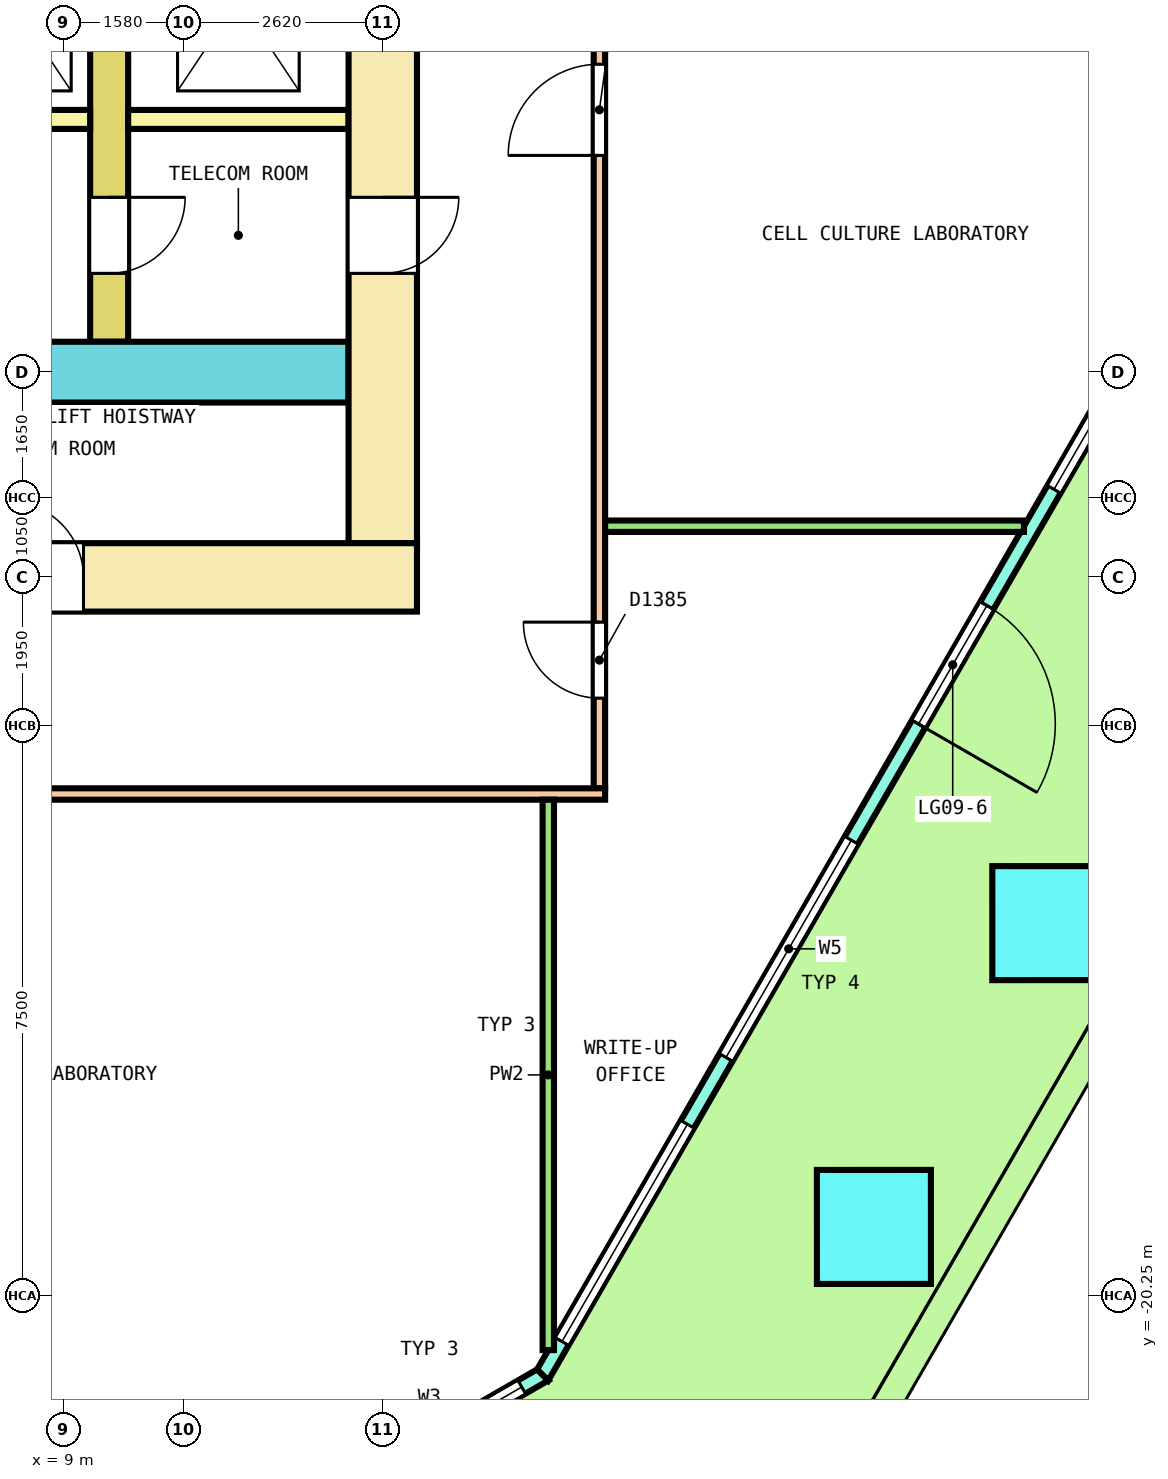
"""IFC4 building model, lengths in metres.
Left out: names, types, materials, properties, quantities, classifications, styles, units other than length and angle.
Written with IfcOpenShell. Run it as: python <this file> out.ifc"""

import sys

from ifc_helpers import new_model, si_unit, direction, frame, frame_2d, origin, origin_2d, place, context, subcontext, project, spatial, polyline, rectangle, outline, extrude, element, fill, save


model = new_model("IFC4")
c1 = context("Model", 3, precision=1e-05, world=origin(), true_north=direction((0.0, 1.0)))
c2 = subcontext(c1, "Body", "Model", "MODEL_VIEW")
j1 = project(units=[si_unit("LENGTHUNIT", "METRE"), si_unit("PLANEANGLEUNIT", "RADIAN")], contexts=[c1])
p1 = place(None, origin())
s1 = spatial("IfcSite", under=j1, at=p1, CompositionType="ELEMENT")
p2 = place(p1, origin())
s2 = spatial("IfcBuilding", under=s1, at=p2, CompositionType="ELEMENT")
p3 = place(p2, frame((0.0, 0.0, 41.0)))
s3 = spatial("IfcBuildingStorey", under=s2, at=p3, CompositionType="ELEMENT", Elevation=41.0)
p4 = place(p3, frame((19.662, -19.345, 0.0), z_axis=(-0.010908253887, -0.018863444567, 0.99976256204), x_axis=(0.50018659929, 0.865643429133, 0.021790353113)))
e1 = element("IfcColumn", 1, at=p4, inside=s3, PredefinedType="COLUMN", context=c2, shape_type="SweptSolid", body=[
    extrude(rectangle(XDim=1.5, YDim=1.5, at=origin_2d()), origin(), (0.0, 0.0, 1.0), 4.051),
])
p5 = place(p3, frame((21.969, -15.348, 0.0), z_axis=(-0.003616759812, -0.006269050341, 0.999973808685), x_axis=(0.499535500447, 0.866263182786, 0.007237536985)))
e2 = element("IfcColumn", 2, at=p5, inside=s3, PredefinedType="COLUMN", context=c2, shape_type="SweptSolid", body=[
    extrude(rectangle(XDim=1.5, YDim=1.5, at=origin_2d()), origin(), (0.0, 0.0, 1.0), 4.05),
])
p6 = place(p3, frame((9.351, -24.73, 0.0), z_axis=(0.0, 0.0, 1.0), x_axis=(0.866014080581, 0.50001961185, 0.0)))
e3 = element("IfcWall", 3, at=p6, inside=s3, PredefinedType="SOLIDWALL", context=c2, shape_type="SweptSolid", body=[
    extrude(outline(polyline([(-0.027, -0.1), (1.128, -0.1), (2.283, -0.1), (3.438, -0.1), (4.592, -0.1), (5.747, -0.1), (6.902, -0.1), (6.848, 0.1), (5.711, 0.1), (4.574, 0.1), (3.438, 0.1), (2.301, 0.1), (1.164, 0.1), (0.027, 0.1), (-0.027, -0.1)])), origin(), (0.0, 0.0, 1.0), 4.1),
])
p7 = place(p6, frame((0.319, 0.0, 0.1)))
e4 = element("IfcOpeningElement", 4, at=p7, cuts=e3, PredefinedType="OPENING", context=c2, shape_type="SweptSolid", body=[
    extrude(rectangle(XDim=2.8, YDim=2.9, at=frame_2d((1.4, 1.45))), frame((0.0, 0.11, 0.0), z_axis=(0.0, -1.0, 0.0), x_axis=(1.0, 0.0, 0.0)), (0.0, 0.0, 1.0), 0.22),
])
p8 = place(p6, frame((3.756, 0.0, 0.1)))
e5 = element("IfcOpeningElement", 5, at=p8, cuts=e3, PredefinedType="OPENING", context=c2, shape_type="SweptSolid", body=[
    extrude(rectangle(XDim=2.8, YDim=2.9, at=frame_2d((1.4, 1.45))), frame((0.0, 0.11, 0.0), z_axis=(0.0, -1.0, 0.0), x_axis=(1.0, 0.0, 0.0)), (0.0, 0.0, 1.0), 0.22),
])
p9 = place(p3, frame((15.304, -21.292, 0.0), z_axis=(0.0, 0.0, 1.0), x_axis=(0.500001945179, 0.866024280732, 0.0)))
e6 = element("IfcWall", 6, at=p9, inside=s3, PredefinedType="SOLIDWALL", context=c2, shape_type="SweptSolid", body=[
    extrude(outline(polyline([(-0.027, -0.1), (1.003, -0.1), (2.033, -0.1), (3.063, -0.1), (4.093, -0.1), (5.123, -0.1), (6.153, -0.1), (7.183, -0.1), (8.213, -0.1), (9.243, -0.1), (10.273, -0.1), (11.302, -0.1), (12.333, -0.1), (13.363, -0.1), (14.392, -0.1), (15.422, -0.1), (16.452, -0.1), (17.482, -0.1), (18.512, -0.1), (19.542, -0.1), (20.572, -0.1), (21.602, -0.1), (21.548, 0.1), (20.523, 0.1), (19.499, 0.1), (18.474, 0.1), (17.449, 0.1), (16.424, 0.1), (15.399, 0.1), (14.375, 0.1), (13.35, 0.1), (12.325, 0.1), (11.3, 0.1), (10.275, 0.1), (9.25, 0.1), (8.226, 0.1), (7.201, 0.1), (6.176, 0.1), (5.151, 0.1), (4.126, 0.1), (3.101, 0.1), (2.076, 0.1), (1.052, 0.1), (0.027, 0.1), (-0.027, -0.1)])), origin(), (0.0, 0.0, 1.0), 4.1),
])
p10 = place(p9, frame((0.508, 0.0, 0.1)))
e7 = element("IfcOpeningElement", 7, at=p10, cuts=e6, PredefinedType="OPENING", context=c2, shape_type="SweptSolid", body=[
    extrude(rectangle(XDim=3.3, YDim=2.9, at=frame_2d((1.65, 1.45))), frame((0.0, 0.11, 0.0), z_axis=(0.0, -1.0, 0.0), x_axis=(1.0, 0.0, 0.0)), (0.0, 0.0, 1.0), 0.22),
])
p11 = place(p9, frame((4.823, 0.0, 0.1)))
e8 = element("IfcOpeningElement", 8, at=p11, cuts=e6, PredefinedType="OPENING", context=c2, shape_type="SweptSolid", body=[
    extrude(rectangle(XDim=3.3, YDim=2.9, at=frame_2d((1.65, 1.45))), frame((0.0, 0.11, 0.0), z_axis=(0.0, -1.0, 0.0), x_axis=(1.0, 0.0, 0.0)), (0.0, 0.0, 1.0), 0.22),
])
p12 = place(p9, frame((9.888, 0.0, 0.0)))
e9 = element("IfcOpeningElement", 9, at=p12, cuts=e6, PredefinedType="OPENING", context=c2, shape_type="SweptSolid", body=[
    extrude(rectangle(XDim=1.8, YDim=2.4, at=frame_2d((0.9, 1.2))), frame((0.0, 0.11, 0.0), z_axis=(0.0, -1.0, 0.0), x_axis=(1.0, 0.0, 0.0)), (0.0, 0.0, 1.0), 0.22),
])
p13 = place(p9, frame((9.888, 0.0, 2.55)))
e10 = element("IfcOpeningElement", 10, at=p13, cuts=e6, PredefinedType="OPENING", context=c2, shape_type="SweptSolid", body=[
    extrude(rectangle(XDim=1.8, YDim=0.45, at=frame_2d((0.9, 0.225))), frame((0.0, 0.11, 0.0), z_axis=(0.0, -1.0, 0.0), x_axis=(1.0, 0.0, 0.0)), (0.0, 0.0, 1.0), 0.22),
])
p14 = place(p9, frame((13.453, 0.0, 0.1)))
e11 = element("IfcOpeningElement", 11, at=p14, cuts=e6, PredefinedType="OPENING", context=c2, shape_type="SweptSolid", body=[
    extrude(rectangle(XDim=3.3, YDim=2.9, at=frame_2d((1.65, 1.45))), frame((0.0, 0.11, 0.0), z_axis=(0.0, -1.0, 0.0), x_axis=(1.0, 0.0, 0.0)), (0.0, 0.0, 1.0), 0.22),
])
p15 = place(p9, frame((17.768, 0.0, 0.1)))
e12 = element("IfcOpeningElement", 12, at=p15, cuts=e6, PredefinedType="OPENING", context=c2, shape_type="SweptSolid", body=[
    extrude(rectangle(XDim=3.3, YDim=2.9, at=frame_2d((1.65, 1.45))), frame((0.0, 0.11, 0.0), z_axis=(0.0, -1.0, 0.0), x_axis=(1.0, 0.0, 0.0)), (0.0, 0.0, 1.0), 0.22),
])
p16 = place(p3, frame((-13.65, -10.8, 0.0), z_axis=(0.0, 0.0, 1.0), x_axis=(1.0, 0.0, 0.0)))
e13 = element("IfcWall", 13, at=p16, inside=s3, PredefinedType="SHEAR", context=c2, shape_type="SweptSolid", body=[
    extrude(rectangle(XDim=27.3, YDim=0.9, at=frame_2d((13.65, 0.0))), origin(), (0.0, 0.0, 1.0), 4.1),
])
p17 = place(p16, frame((1.911, 0.0, 0.0)))
e14 = element("IfcOpeningElement", 14, at=p17, cuts=e13, PredefinedType="OPENING", context=c2, shape_type="SweptSolid", body=[
    extrude(rectangle(XDim=1.0, YDim=2.1, at=frame_2d((0.5, 1.05))), frame((0.0, 0.46, 0.0), z_axis=(0.0, -1.0, 0.0), x_axis=(1.0, 0.0, 0.0)), (0.0, 0.0, 1.0), 0.92),
])
p18 = place(p16, frame((5.027, 0.0, 0.0)))
e15 = element("IfcOpeningElement", 15, at=p18, cuts=e13, PredefinedType="OPENING", context=c2, shape_type="SweptSolid", body=[
    extrude(rectangle(XDim=1.0, YDim=2.1, at=frame_2d((0.5, 1.05))), frame((0.0, 0.46, 0.0), z_axis=(0.0, -1.0, 0.0), x_axis=(1.0, 0.0, 0.0)), (0.0, 0.0, 1.0), 0.92),
])
p19 = place(p16, frame((8.111, 0.0, 0.0)))
e16 = element("IfcOpeningElement", 16, at=p19, cuts=e13, PredefinedType="OPENING", context=c2, shape_type="SweptSolid", body=[
    extrude(rectangle(XDim=1.0, YDim=2.1, at=frame_2d((0.5, 1.05))), frame((0.0, 0.46, 0.0), z_axis=(0.0, -1.0, 0.0), x_axis=(1.0, 0.0, 0.0)), (0.0, 0.0, 1.0), 0.92),
])
p20 = place(p16, frame((11.195, 0.0, 0.0)))
e17 = element("IfcOpeningElement", 17, at=p20, cuts=e13, PredefinedType="OPENING", context=c2, shape_type="SweptSolid", body=[
    extrude(rectangle(XDim=1.0, YDim=2.1, at=frame_2d((0.5, 1.05))), frame((0.0, 0.46, 0.0), z_axis=(0.0, -1.0, 0.0), x_axis=(1.0, 0.0, 0.0)), (0.0, 0.0, 1.0), 0.92),
])
p21 = place(p16, frame((21.913, 0.0, 0.0)))
e18 = element("IfcOpeningElement", 18, at=p21, cuts=e13, PredefinedType="OPENING", context=c2, shape_type="SweptSolid", body=[
    extrude(rectangle(XDim=1.0, YDim=2.1, at=frame_2d((0.5, 1.05))), frame((0.0, 0.46, 0.0), z_axis=(0.0, -1.0, 0.0), x_axis=(1.0, 0.0, 0.0)), (0.0, 0.0, 1.0), 0.92),
])
p22 = place(p16, frame((15.2, 0.0, 0.0)))
e19 = element("IfcOpeningElement", 19, at=p22, cuts=e13, PredefinedType="OPENING", context=c2, shape_type="SweptSolid", body=[
    extrude(rectangle(XDim=1.2, YDim=2.1, at=frame_2d((0.6, 1.05))), frame((0.0, 0.46, 0.0), z_axis=(0.0, -1.0, 0.0), x_axis=(1.0, 0.0, 0.0)), (0.0, 0.0, 1.0), 0.92),
])
p23 = place(p3, frame((13.2, -10.35, 0.0), z_axis=(0.0, 0.0, 1.0), x_axis=(0.0, 1.0, 0.0)))
e20 = element("IfcWall", 20, at=p23, inside=s3, PredefinedType="SHEAR", context=c2, shape_type="SweptSolid", body=[
    extrude(rectangle(XDim=20.7, YDim=0.9, at=frame_2d((10.35, 0.0))), origin(), (0.0, 0.0, 1.0), 4.1),
])
p24 = place(p23, frame((9.15, 0.0, 0.0)))
e21 = element("IfcOpeningElement", 21, at=p24, cuts=e20, PredefinedType="OPENING", context=c2, shape_type="SweptSolid", body=[
    extrude(rectangle(XDim=2.4, YDim=2.1, at=frame_2d((1.2, 1.05))), frame((0.0, 0.46, 0.0), z_axis=(0.0, -1.0, 0.0), x_axis=(1.0, 0.0, 0.0)), (0.0, 0.0, 1.0), 0.92),
])
p25 = place(p23, frame((16.05, 0.0, 0.0)))
e22 = element("IfcOpeningElement", 22, at=p25, cuts=e20, PredefinedType="OPENING", context=c2, shape_type="SweptSolid", body=[
    extrude(rectangle(XDim=1.2, YDim=2.1, at=frame_2d((0.6, 1.05))), frame((0.0, 0.46, 0.0), z_axis=(0.0, -1.0, 0.0), x_axis=(1.0, 0.0, 0.0)), (0.0, 0.0, 1.0), 0.92),
])
p26 = place(p23, frame((3.55, 0.0, 0.0)))
e23 = element("IfcOpeningElement", 23, at=p26, cuts=e20, PredefinedType="OPENING", context=c2, shape_type="SweptSolid", body=[
    extrude(rectangle(XDim=1.0, YDim=2.1, at=frame_2d((0.5, 1.05))), frame((0.0, 0.46, 0.0), z_axis=(0.0, -1.0, 0.0), x_axis=(1.0, 0.0, 0.0)), (0.0, 0.0, 1.0), 0.92),
])
p27 = place(p3, frame((-12.75, -8.1, 0.0), z_axis=(0.0, 0.0, 1.0), x_axis=(1.0, 0.0, 0.0)))
e24 = element("IfcWall", 24, at=p27, inside=s3, PredefinedType="SHEAR", context=c2, shape_type="SweptSolid", body=[
    extrude(rectangle(XDim=25.5, YDim=0.8, at=frame_2d((12.75, 0.0))), origin(), (0.0, 0.0, 1.0), 4.1),
])
p28 = place(p27, frame((14.3, 0.0, 0.0)))
e25 = element("IfcOpeningElement", 25, at=p28, cuts=e24, PredefinedType="OPENING", context=c2, shape_type="SweptSolid", body=[
    extrude(rectangle(XDim=1.2, YDim=2.1, at=frame_2d((0.6, 1.05))), frame((0.0, 0.41, 0.0), z_axis=(0.0, -1.0, 0.0), x_axis=(1.0, 0.0, 0.0)), (0.0, 0.0, 1.0), 0.82),
])
p29 = place(p3, frame((9.6, -7.7, 0.0), z_axis=(0.0, 0.0, 1.0), x_axis=(0.0, 1.0, 0.0)))
e26 = element("IfcWall", 26, at=p29, inside=s3, PredefinedType="SHEAR", context=c2, shape_type="SweptSolid", body=[
    extrude(rectangle(XDim=15.4, YDim=0.5, at=frame_2d((7.7, 0.0))), origin(), (0.0, 0.0, 1.0), 4.1),
])
p30 = place(p29, frame((6.5, 0.0, 0.0)))
e27 = element("IfcOpeningElement", 27, at=p30, cuts=e26, PredefinedType="OPENING", context=c2, shape_type="SweptSolid", body=[
    extrude(rectangle(XDim=2.4, YDim=2.1, at=frame_2d((1.2, 1.05))), frame((0.0, 0.26, 0.0), z_axis=(0.0, -1.0, 0.0), x_axis=(1.0, 0.0, 0.0)), (0.0, 0.0, 1.0), 0.52),
])
p31 = place(p29, frame((13.4, 0.0, 0.0)))
e28 = element("IfcOpeningElement", 28, at=p31, cuts=e26, PredefinedType="OPENING", context=c2, shape_type="SweptSolid", body=[
    extrude(rectangle(XDim=1.2, YDim=2.1, at=frame_2d((0.6, 1.05))), frame((0.0, 0.26, 0.0), z_axis=(0.0, -1.0, 0.0), x_axis=(1.0, 0.0, 0.0)), (0.0, 0.0, 1.0), 0.52),
])
p32 = place(p29, frame((0.9, 0.0, 0.0)))
e29 = element("IfcOpeningElement", 29, at=p32, cuts=e26, PredefinedType="OPENING", context=c2, shape_type="SweptSolid", body=[
    extrude(rectangle(XDim=1.0, YDim=2.1, at=frame_2d((0.5, 1.05))), frame((0.0, 0.26, 0.0), z_axis=(0.0, -1.0, 0.0), x_axis=(1.0, 0.0, 0.0)), (0.0, 0.0, 1.0), 0.52),
])
p33 = place(p3, frame((-9.35, -4.775, 0.0), z_axis=(0.0, 0.0, 1.0), x_axis=(1.0, 0.0, 0.0)))
e30 = element("IfcWall", 30, at=p33, inside=s3, PredefinedType="SOLIDWALL", context=c2, shape_type="SweptSolid", body=[
    extrude(rectangle(XDim=18.7, YDim=0.25, at=frame_2d((9.35, 0.0))), origin(), (0.0, 0.0, 1.0), 4.1),
])
p34 = place(p3, frame((9.85, -4.775, 0.0), z_axis=(0.0, 0.0, 1.0), x_axis=(1.0, 0.0, 0.0)))
e31 = element("IfcWall", 31, at=p34, inside=s3, PredefinedType="SOLIDWALL", context=c2, shape_type="SweptSolid", body=[
    extrude(rectangle(XDim=2.9, YDim=0.25, at=frame_2d((1.45, 0.0))), origin(), (0.0, 0.0, 1.0), 4.1),
])
p35 = place(p3, frame((16.05, -13.575, 0.0), z_axis=(0.0, 0.0, 1.0), x_axis=(0.0, 1.0, 0.0)))
e32 = element("IfcWall", 32, at=p35, inside=s3, PredefinedType="PARTITIONING", context=c2, shape_type="SweptSolid", body=[
    extrude(rectangle(XDim=27.15, YDim=0.15, at=frame_2d((13.575, 0.0))), origin(), (0.0, 0.0, 1.0), 3.05),
])
p36 = place(p35, frame((17.161, 0.0, 0.0)))
e33 = element("IfcOpeningElement", 33, at=p36, cuts=e32, PredefinedType="OPENING", context=c2, shape_type="SweptSolid", body=[
    extrude(rectangle(XDim=1.2, YDim=2.1, at=frame_2d((0.6, 1.05))), frame((0.0, 0.085, 0.0), z_axis=(0.0, -1.0, 0.0), x_axis=(1.0, 0.0, 0.0)), (0.0, 0.0, 1.0), 0.17),
])
p37 = place(p35, frame((23.671, 0.0, 0.0)))
e34 = element("IfcOpeningElement", 34, at=p37, cuts=e32, PredefinedType="OPENING", context=c2, shape_type="SweptSolid", body=[
    extrude(rectangle(XDim=1.0, YDim=2.1, at=frame_2d((0.5, 1.05))), frame((0.0, 0.085, 0.0), z_axis=(0.0, -1.0, 0.0), x_axis=(1.0, 0.0, 0.0)), (0.0, 0.0, 1.0), 0.17),
])
p38 = place(p35, frame((1.187, 0.0, 0.0)))
e35 = element("IfcOpeningElement", 35, at=p38, cuts=e32, PredefinedType="OPENING", context=c2, shape_type="SweptSolid", body=[
    extrude(rectangle(XDim=1.0, YDim=2.1, at=frame_2d((0.5, 1.05))), frame((0.0, 0.085, 0.0), z_axis=(0.0, -1.0, 0.0), x_axis=(1.0, 0.0, 0.0)), (0.0, 0.0, 1.0), 0.17),
])
p39 = place(p35, frame((8.326, 0.0, 0.0)))
e36 = element("IfcOpeningElement", 36, at=p39, cuts=e32, PredefinedType="OPENING", context=c2, shape_type="SweptSolid", body=[
    extrude(rectangle(XDim=1.2, YDim=2.1, at=frame_2d((0.6, 1.05))), frame((0.0, 0.085, 0.0), z_axis=(0.0, -1.0, 0.0), x_axis=(1.0, 0.0, 0.0)), (0.0, 0.0, 1.0), 0.17),
])
p40 = place(p3, frame((-16.0, -13.65, 0.0), z_axis=(0.0, 0.0, 1.0), x_axis=(1.0, 0.0, 0.0)))
e37 = element("IfcWall", 37, at=p40, inside=s3, PredefinedType="PARTITIONING", context=c2, shape_type="SweptSolid", body=[
    extrude(rectangle(XDim=32.125, YDim=0.15, at=frame_2d((16.062, 0.0))), origin(), (0.0, 0.0, 1.0), 3.05),
])
p41 = place(p40, frame((2.935, 0.0, 0.0)))
e38 = element("IfcOpeningElement", 38, at=p41, cuts=e37, PredefinedType="OPENING", context=c2, shape_type="SweptSolid", body=[
    extrude(rectangle(XDim=1.2, YDim=2.1, at=frame_2d((0.6, 1.05))), frame((0.0, 0.085, 0.0), z_axis=(0.0, -1.0, 0.0), x_axis=(1.0, 0.0, 0.0)), (0.0, 0.0, 1.0), 0.17),
])
p42 = place(p40, frame((13.524, 0.0, 0.0)))
e39 = element("IfcOpeningElement", 39, at=p42, cuts=e37, PredefinedType="OPENING", context=c2, shape_type="SweptSolid", body=[
    extrude(rectangle(XDim=1.2, YDim=2.1, at=frame_2d((0.6, 1.05))), frame((0.0, 0.085, 0.0), z_axis=(0.0, -1.0, 0.0), x_axis=(1.0, 0.0, 0.0)), (0.0, 0.0, 1.0), 0.17),
])
p43 = place(p40, frame((21.126, 0.0, 0.0)))
e40 = element("IfcOpeningElement", 40, at=p43, cuts=e37, PredefinedType="OPENING", context=c2, shape_type="SweptSolid", body=[
    extrude(rectangle(XDim=1.2, YDim=2.1, at=frame_2d((0.6, 1.05))), frame((0.0, 0.085, 0.0), z_axis=(0.0, -1.0, 0.0), x_axis=(1.0, 0.0, 0.0)), (0.0, 0.0, 1.0), 0.17),
])
p44 = place(p3, frame((15.377, -20.966, 0.0), z_axis=(0.0, 0.0, 1.0), x_axis=(0.0, 1.0, 0.0)))
e41 = element("IfcWall", 41, at=p44, inside=s3, PredefinedType="PARTITIONING", context=c2, shape_type="SweptSolid", body=[
    extrude(rectangle(XDim=7.24, YDim=0.15, at=frame_2d((3.62, 0.0))), origin(), (0.0, 0.0, 1.0), 3.05),
])
p45 = place(p3, frame((16.125, -10.127, 0.0), z_axis=(0.0, 0.0, 1.0), x_axis=(1.0, 0.0, 0.0)))
e42 = element("IfcWall", 42, at=p45, inside=s3, PredefinedType="PARTITIONING", context=c2, shape_type="SweptSolid", body=[
    extrude(rectangle(XDim=5.51, YDim=0.15, at=frame_2d((2.755, 0.0))), origin(), (0.0, 0.0, 1.0), 3.05),
])
p46 = place(p8, origin())
e43 = element("IfcWindow", 43, at=p46, inside=s3, PartitioningType="SINGLE_PANEL", PredefinedType="WINDOW", context=c2, shape_type="SweptSolid", body=[
    extrude(rectangle(XDim=2.8, YDim=2.9, at=frame_2d((1.4, 1.45))), frame((0.0, 0.03, 0.0), z_axis=(0.0, -1.0, 0.0), x_axis=(1.0, 0.0, 0.0)), (0.0, 0.0, 1.0), 0.06),
])
fill(e5, e43)
p47 = place(p10, origin())
e44 = element("IfcWindow", 44, at=p47, inside=s3, PartitioningType="SINGLE_PANEL", PredefinedType="WINDOW", context=c2, shape_type="SweptSolid", body=[
    extrude(rectangle(XDim=3.3, YDim=2.9, at=frame_2d((1.65, 1.45))), frame((0.0, 0.03, 0.0), z_axis=(0.0, -1.0, 0.0), x_axis=(1.0, 0.0, 0.0)), (0.0, 0.0, 1.0), 0.06),
])
fill(e7, e44)
p48 = place(p11, origin())
e45 = element("IfcWindow", 45, at=p48, inside=s3, PartitioningType="SINGLE_PANEL", PredefinedType="WINDOW", context=c2, shape_type="SweptSolid", body=[
    extrude(rectangle(XDim=3.3, YDim=2.9, at=frame_2d((1.65, 1.45))), frame((0.0, 0.03, 0.0), z_axis=(0.0, -1.0, 0.0), x_axis=(1.0, 0.0, 0.0)), (0.0, 0.0, 1.0), 0.06),
])
fill(e8, e45)
p49 = place(p12, origin())
e46 = element("IfcDoor", 46, at=p49, inside=s3, OperationType="DOUBLE_DOOR_SINGLE_SWING", PredefinedType="DOOR", context=c2, shape_type="SweptSolid", body=[
    extrude(rectangle(XDim=1.8, YDim=2.4, at=frame_2d((0.9, 1.2))), frame((0.0, 0.025, 0.0), z_axis=(0.0, -1.0, 0.0), x_axis=(1.0, 0.0, 0.0)), (0.0, 0.0, 1.0), 0.05),
])
fill(e9, e46)
p50 = place(p13, origin())
e47 = element("IfcWindow", 47, at=p50, inside=s3, PartitioningType="SINGLE_PANEL", PredefinedType="WINDOW", context=c2, shape_type="SweptSolid", body=[
    extrude(rectangle(XDim=1.8, YDim=0.45, at=frame_2d((0.9, 0.225))), frame((0.0, 0.03, 0.0), z_axis=(0.0, -1.0, 0.0), x_axis=(1.0, 0.0, 0.0)), (0.0, 0.0, 1.0), 0.06),
])
fill(e10, e47)
p51 = place(p14, origin())
e48 = element("IfcWindow", 48, at=p51, inside=s3, PartitioningType="SINGLE_PANEL", PredefinedType="WINDOW", context=c2, shape_type="SweptSolid", body=[
    extrude(rectangle(XDim=3.3, YDim=2.9, at=frame_2d((1.65, 1.45))), frame((0.0, 0.03, 0.0), z_axis=(0.0, -1.0, 0.0), x_axis=(1.0, 0.0, 0.0)), (0.0, 0.0, 1.0), 0.06),
])
fill(e11, e48)
p52 = place(p32, origin())
e49 = element("IfcDoor", 49, at=p52, inside=s3, OperationType="SINGLE_SWING_RIGHT", PredefinedType="DOOR", context=c2, shape_type="SweptSolid", body=[
    extrude(rectangle(XDim=1.0, YDim=2.1, at=frame_2d((0.5, 1.05))), frame((0.0, 0.2, 0.0), z_axis=(0.0, -1.0, 0.0), x_axis=(1.0, 0.0, 0.0)), (0.0, 0.0, 1.0), 0.4),
])
fill(e29, e49)
p53 = place(p26, origin())
e50 = element("IfcDoor", 50, at=p53, inside=s3, OperationType="SINGLE_SWING_LEFT", PredefinedType="DOOR", context=c2, shape_type="SweptSolid", body=[
    extrude(rectangle(XDim=1.0, YDim=2.1, at=frame_2d((0.5, 1.05))), frame((0.0, 0.3, 0.0), z_axis=(0.0, -1.0, 0.0), x_axis=(1.0, 0.0, 0.0)), (0.0, 0.0, 1.0), 0.6),
])
fill(e23, e50)
p54 = place(p21, origin())
e51 = element("IfcDoor", 51, at=p54, inside=s3, OperationType="SINGLE_SWING_LEFT", PredefinedType="DOOR", context=c2, shape_type="SweptSolid", body=[
    extrude(rectangle(XDim=1.0, YDim=2.1, at=frame_2d((0.5, 1.05))), frame((0.0, 0.3, 0.0), z_axis=(0.0, -1.0, 0.0), x_axis=(1.0, 0.0, 0.0)), (0.0, 0.0, 1.0), 0.6),
])
fill(e18, e51)
p55 = place(p38, origin())
e52 = element("IfcDoor", 52, at=p55, inside=s3, OperationType="SINGLE_SWING_LEFT", PredefinedType="DOOR", context=c2, shape_type="SweptSolid", body=[
    extrude(rectangle(XDim=1.0, YDim=2.1, at=frame_2d((0.5, 1.05))), frame((0.0, 0.025, 0.0), z_axis=(0.0, -1.0, 0.0), x_axis=(1.0, 0.0, 0.0)), (0.0, 0.0, 1.0), 0.05),
])
fill(e35, e52)
p56 = place(p39, origin())
e53 = element("IfcDoor", 53, at=p56, inside=s3, OperationType="DOUBLE_DOOR_SINGLE_SWING", PredefinedType="DOOR", context=c2, shape_type="SweptSolid", body=[
    extrude(rectangle(XDim=1.2, YDim=2.1, at=frame_2d((0.6, 1.05))), frame((0.0, 0.025, 0.0), z_axis=(0.0, -1.0, 0.0), x_axis=(1.0, 0.0, 0.0)), (0.0, 0.0, 1.0), 0.05),
])
fill(e36, e53)
save(model, sys.argv[1])
